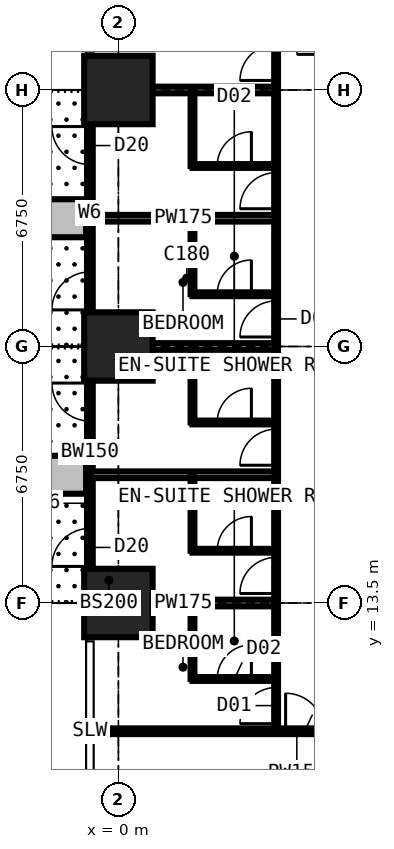
"""IFC4 building model, lengths in metres.
Left out: names, types, materials, properties, quantities, classifications, styles, units other than length and angle.
Written with IfcOpenShell. Run it as: python <this file> out.ifc"""

import sys

from ifc_helpers import new_model, si_unit, direction, frame, frame_2d, origin, origin_2d, place, context, subcontext, project, spatial, rectangle, extrude, element, fill, save


model = new_model("IFC4")
c1 = context("Model", 3, precision=1e-05, world=origin(), true_north=direction((0.0, 1.0)))
c2 = subcontext(c1, "Body", "Model", "MODEL_VIEW")
j1 = project(units=[si_unit("LENGTHUNIT", "METRE"), si_unit("PLANEANGLEUNIT", "RADIAN")], contexts=[c1])
p1 = place(None, origin())
s1 = spatial("IfcSite", under=j1, at=p1, CompositionType="ELEMENT")
p2 = place(p1, origin())
s2 = spatial("IfcBuilding", under=s1, at=p2, CompositionType="ELEMENT")
p3 = place(p2, frame((0.0, 0.0, 46.8)))
s3 = spatial("IfcBuildingStorey", under=s2, at=p3, CompositionType="ELEMENT", Elevation=46.8)
for number, where, z_axis, x_axis in (
    (1, (0.0, 13.5, 0.0), (0.0, 0.0, 1.0), (1.0, 0.0, 0.0)),
    (2, (0.0, 20.25, 0.0), (0.0, 0.0, 1.0), (1.0, 0.0, 0.0)),
    (3, (0.0, 27.0, 0.0), (0.0, 0.0, 1.0), (1.0, 0.0, 0.0)),
):
    element("IfcColumn", number, at=place(p3, frame(where, z_axis=z_axis, x_axis=x_axis)), inside=s3, PredefinedType="COLUMN", context=c2, shape_type="SweptSolid", body=[
        extrude(rectangle(XDim=1.8, YDim=1.8, at=origin_2d()), origin(), (0.0, 0.0, 1.0), 3.6),
    ])
p4 = place(p3, frame((-0.75, 13.5, 0.0), z_axis=(0.0, 0.0, 1.0), x_axis=(0.0, 1.0, 0.0)))
e4 = element("IfcWall", 4, at=p4, inside=s3, PredefinedType="SOLIDWALL", context=c2, shape_type="SweptSolid", body=[
    extrude(rectangle(XDim=6.75, YDim=0.15, at=frame_2d((3.375, 0.0))), origin(), (0.0, 0.0, 1.0), 3.375),
])
p5 = place(p4, frame((0.962, 0.0, 0.0)))
e5 = element("IfcOpeningElement", 5, at=p5, cuts=e4, PredefinedType="OPENING", context=c2, shape_type="SweptSolid", body=[
    extrude(rectangle(XDim=1.0, YDim=2.2, at=frame_2d((0.5, 1.1))), frame((0.0, 0.085, 0.0), z_axis=(0.0, -1.0, 0.0), x_axis=(1.0, 0.0, 0.0)), (0.0, 0.0, 1.0), 0.17),
])
p6 = place(p4, frame((2.025, 0.0, 0.9)))
e6 = element("IfcOpeningElement", 6, at=p6, cuts=e4, PredefinedType="OPENING", context=c2, shape_type="SweptSolid", body=[
    extrude(rectangle(XDim=1.2, YDim=1.8, at=frame_2d((0.6, 0.9))), frame((0.0, 0.085, 0.0), z_axis=(0.0, -1.0, 0.0), x_axis=(1.0, 0.0, 0.0)), (0.0, 0.0, 1.0), 0.17),
])
p7 = place(p4, frame((4.788, 0.0, 0.0)))
e7 = element("IfcOpeningElement", 7, at=p7, cuts=e4, PredefinedType="OPENING", context=c2, shape_type="SweptSolid", body=[
    extrude(rectangle(XDim=1.0, YDim=2.2, at=frame_2d((0.5, 1.1))), frame((0.0, 0.085, 0.0), z_axis=(0.0, -1.0, 0.0), x_axis=(1.0, 0.0, 0.0)), (0.0, 0.0, 1.0), 0.17),
])
p8 = place(p4, frame((3.525, 0.0, 0.9)))
e8 = element("IfcOpeningElement", 8, at=p8, cuts=e4, PredefinedType="OPENING", context=c2, shape_type="SweptSolid", body=[
    extrude(rectangle(XDim=1.2, YDim=1.8, at=frame_2d((0.6, 0.9))), frame((0.0, 0.085, 0.0), z_axis=(0.0, -1.0, 0.0), x_axis=(1.0, 0.0, 0.0)), (0.0, 0.0, 1.0), 0.17),
])
p9 = place(p3, frame((-0.75, 20.25, 0.0), z_axis=(0.0, 0.0, 1.0), x_axis=(0.0, 1.0, 0.0)))
e9 = element("IfcWall", 9, at=p9, inside=s3, PredefinedType="SOLIDWALL", context=c2, shape_type="SweptSolid", body=[
    extrude(rectangle(XDim=6.75, YDim=0.15, at=frame_2d((3.375, 0.0))), origin(), (0.0, 0.0, 1.0), 3.375),
])
p10 = place(p9, frame((0.962, 0.0, 0.0)))
e10 = element("IfcOpeningElement", 10, at=p10, cuts=e9, PredefinedType="OPENING", context=c2, shape_type="SweptSolid", body=[
    extrude(rectangle(XDim=1.0, YDim=2.2, at=frame_2d((0.5, 1.1))), frame((0.0, 0.085, 0.0), z_axis=(0.0, -1.0, 0.0), x_axis=(1.0, 0.0, 0.0)), (0.0, 0.0, 1.0), 0.17),
])
p11 = place(p9, frame((2.025, 0.0, 0.9)))
e11 = element("IfcOpeningElement", 11, at=p11, cuts=e9, PredefinedType="OPENING", context=c2, shape_type="SweptSolid", body=[
    extrude(rectangle(XDim=1.2, YDim=1.8, at=frame_2d((0.6, 0.9))), frame((0.0, 0.085, 0.0), z_axis=(0.0, -1.0, 0.0), x_axis=(1.0, 0.0, 0.0)), (0.0, 0.0, 1.0), 0.17),
])
p12 = place(p9, frame((4.788, 0.0, 0.0)))
e12 = element("IfcOpeningElement", 12, at=p12, cuts=e9, PredefinedType="OPENING", context=c2, shape_type="SweptSolid", body=[
    extrude(rectangle(XDim=1.0, YDim=2.2, at=frame_2d((0.5, 1.1))), frame((0.0, 0.085, 0.0), z_axis=(0.0, -1.0, 0.0), x_axis=(1.0, 0.0, 0.0)), (0.0, 0.0, 1.0), 0.17),
])
p13 = place(p9, frame((3.525, 0.0, 0.9)))
e13 = element("IfcOpeningElement", 13, at=p13, cuts=e9, PredefinedType="OPENING", context=c2, shape_type="SweptSolid", body=[
    extrude(rectangle(XDim=1.2, YDim=1.8, at=frame_2d((0.6, 0.9))), frame((0.0, 0.085, 0.0), z_axis=(0.0, -1.0, 0.0), x_axis=(1.0, 0.0, 0.0)), (0.0, 0.0, 1.0), 0.17),
])
for number, where, z_axis, x_axis in (
    (14, (-0.85, 16.875, 0.0), (0.0, 0.0, 1.0), (-1.0, 0.0, 0.0)),
    (15, (-0.85, 23.625, 0.0), (0.0, 0.0, 1.0), (-1.0, 0.0, 0.0)),
):
    element("IfcWall", number, at=place(p3, frame(where, z_axis=z_axis, x_axis=x_axis)), inside=s3, PredefinedType="USERDEFINED", context=c2, shape_type="SweptSolid", body=[
        extrude(rectangle(XDim=2.2, YDim=1.0, at=frame_2d((1.1, 0.0))), origin(), (0.0, 0.0, 1.0), 0.9),
    ])
p14 = place(p3, frame((-0.734, 10.125, 0.0), z_axis=(0.0, 0.0, 1.0), x_axis=(1.0, 0.0, 0.0)))
e16 = element("IfcWall", 16, at=p14, inside=s3, PredefinedType="PARTITIONING", context=c2, shape_type="SweptSolid", body=[
    extrude(rectangle(XDim=10.859, YDim=0.15, at=frame_2d((5.429, 0.0))), origin(), (0.0, 0.0, 1.0), 3.375),
])
p15 = place(p14, frame((5.134, 0.0, 0.0)))
e17 = element("IfcOpeningElement", 17, at=p15, cuts=e16, PredefinedType="OPENING", context=c2, shape_type="SweptSolid", body=[
    extrude(rectangle(XDim=1.0, YDim=2.2, at=frame_2d((0.5, 1.1))), frame((0.0, 0.085, 0.0), z_axis=(0.0, -1.0, 0.0), x_axis=(1.0, 0.0, 0.0)), (0.0, 0.0, 1.0), 0.17),
])
p16 = place(p14, frame((8.234, 0.0, 0.0)))
e18 = element("IfcOpeningElement", 18, at=p16, cuts=e16, PredefinedType="OPENING", context=c2, shape_type="SweptSolid", body=[
    extrude(rectangle(XDim=0.95, YDim=2.2, at=frame_2d((0.475, 1.1))), frame((0.0, 0.085, 0.0), z_axis=(0.0, -1.0, 0.0), x_axis=(1.0, 0.0, 0.0)), (0.0, 0.0, 1.0), 0.17),
])
p17 = place(p3, frame((-0.734, 13.5, 0.0), z_axis=(0.0, 0.0, 1.0), x_axis=(1.0, 0.0, 0.0)))
e19 = element("IfcWall", 19, at=p17, inside=s3, PredefinedType="PARTITIONING", context=c2, shape_type="SweptSolid", body=[
    extrude(rectangle(XDim=4.884, YDim=0.175, at=frame_2d((2.442, 0.0))), origin(), (0.0, 0.0, 1.0), 2.877),
])
p18 = place(p3, frame((-0.734, 16.875, 0.0), z_axis=(0.0, 0.0, 1.0), x_axis=(1.0, 0.0, 0.0)))
e20 = element("IfcWall", 20, at=p18, inside=s3, PredefinedType="PARTITIONING", context=c2, shape_type="SweptSolid", body=[
    extrude(rectangle(XDim=4.884, YDim=0.175, at=frame_2d((2.442, 0.0))), origin(), (0.0, 0.0, 1.0), 3.375),
])
p19 = place(p3, frame((-0.734, 20.25, 0.0), z_axis=(0.0, 0.0, 1.0), x_axis=(1.0, 0.0, 0.0)))
e21 = element("IfcWall", 21, at=p19, inside=s3, PredefinedType="PARTITIONING", context=c2, shape_type="SweptSolid", body=[
    extrude(rectangle(XDim=4.884, YDim=0.175, at=frame_2d((2.442, 0.0))), origin(), (0.0, 0.0, 1.0), 2.61),
])
p20 = place(p3, frame((-0.734, 23.625, 0.0), z_axis=(0.0, 0.0, 1.0), x_axis=(1.0, 0.0, 0.0)))
e22 = element("IfcWall", 22, at=p20, inside=s3, PredefinedType="PARTITIONING", context=c2, shape_type="SweptSolid", body=[
    extrude(rectangle(XDim=4.884, YDim=0.175, at=frame_2d((2.442, 0.0))), origin(), (0.0, 0.0, 1.0), 3.375),
])
p21 = place(p3, frame((-0.734, 27.0, 0.0), z_axis=(0.0, 0.0, 1.0), x_axis=(1.0, 0.0, 0.0)))
e23 = element("IfcWall", 23, at=p21, inside=s3, PredefinedType="PARTITIONING", context=c2, shape_type="SweptSolid", body=[
    extrude(rectangle(XDim=4.884, YDim=0.175, at=frame_2d((2.442, 0.0))), origin(), (0.0, 0.0, 1.0), 2.61),
])
p22 = place(p3, frame((1.95, 11.5, 0.0), z_axis=(0.0, 0.0, 1.0), x_axis=(0.0, 1.0, 0.0)))
e24 = element("IfcWall", 24, at=p22, inside=s3, PredefinedType="PARTITIONING", context=c2, shape_type="SweptSolid", body=[
    extrude(rectangle(XDim=2.0, YDim=0.1, at=frame_2d((1.0, 0.0))), origin(), (0.0, 0.0, 1.0), 3.375),
])
p23 = place(p3, frame((1.95, 11.5, 0.0), z_axis=(0.0, 0.0, 1.0), x_axis=(1.0, 0.0, 0.0)))
e25 = element("IfcWall", 25, at=p23, inside=s3, PredefinedType="PARTITIONING", context=c2, shape_type="SweptSolid", body=[
    extrude(rectangle(XDim=2.2, YDim=0.1, at=frame_2d((1.1, 0.0))), origin(), (0.0, 0.0, 1.0), 3.375),
])
p24 = place(p23, frame((0.65, 0.0, 0.0)))
e26 = element("IfcOpeningElement", 26, at=p24, cuts=e25, PredefinedType="OPENING", context=c2, shape_type="SweptSolid", body=[
    extrude(rectangle(XDim=0.9, YDim=2.2, at=frame_2d((0.45, 1.1))), frame((0.0, 0.06, 0.0), z_axis=(0.0, -1.0, 0.0), x_axis=(1.0, 0.0, 0.0)), (0.0, 0.0, 1.0), 0.12),
])
p25 = place(p3, frame((1.95, 14.875, 0.0), z_axis=(0.0, 0.0, 1.0), x_axis=(0.0, 1.0, 0.0)))
e27 = element("IfcWall", 27, at=p25, inside=s3, PredefinedType="PARTITIONING", context=c2, shape_type="SweptSolid", body=[
    extrude(rectangle(XDim=2.0, YDim=0.1, at=frame_2d((1.0, 0.0))), origin(), (0.0, 0.0, 1.0), 3.375),
])
p26 = place(p3, frame((1.95, 14.875, 0.0), z_axis=(0.0, 0.0, 1.0), x_axis=(1.0, 0.0, 0.0)))
e28 = element("IfcWall", 28, at=p26, inside=s3, PredefinedType="PARTITIONING", context=c2, shape_type="SweptSolid", body=[
    extrude(rectangle(XDim=2.2, YDim=0.1, at=frame_2d((1.1, 0.0))), origin(), (0.0, 0.0, 1.0), 3.375),
])
p27 = place(p26, frame((0.65, 0.0, 0.0)))
e29 = element("IfcOpeningElement", 29, at=p27, cuts=e28, PredefinedType="OPENING", context=c2, shape_type="SweptSolid", body=[
    extrude(rectangle(XDim=0.9, YDim=2.2, at=frame_2d((0.45, 1.1))), frame((0.0, 0.06, 0.0), z_axis=(0.0, -1.0, 0.0), x_axis=(1.0, 0.0, 0.0)), (0.0, 0.0, 1.0), 0.12),
])
p28 = place(p3, frame((1.95, 18.25, 0.0), z_axis=(0.0, 0.0, 1.0), x_axis=(0.0, 1.0, 0.0)))
e30 = element("IfcWall", 30, at=p28, inside=s3, PredefinedType="PARTITIONING", context=c2, shape_type="SweptSolid", body=[
    extrude(rectangle(XDim=2.0, YDim=0.1, at=frame_2d((1.0, 0.0))), origin(), (0.0, 0.0, 1.0), 3.375),
])
p29 = place(p3, frame((1.95, 18.25, 0.0), z_axis=(0.0, 0.0, 1.0), x_axis=(1.0, 0.0, 0.0)))
e31 = element("IfcWall", 31, at=p29, inside=s3, PredefinedType="PARTITIONING", context=c2, shape_type="SweptSolid", body=[
    extrude(rectangle(XDim=2.2, YDim=0.1, at=frame_2d((1.1, 0.0))), origin(), (0.0, 0.0, 1.0), 3.375),
])
p30 = place(p29, frame((0.65, 0.0, 0.0)))
e32 = element("IfcOpeningElement", 32, at=p30, cuts=e31, PredefinedType="OPENING", context=c2, shape_type="SweptSolid", body=[
    extrude(rectangle(XDim=0.9, YDim=2.2, at=frame_2d((0.45, 1.1))), frame((0.0, 0.06, 0.0), z_axis=(0.0, -1.0, 0.0), x_axis=(1.0, 0.0, 0.0)), (0.0, 0.0, 1.0), 0.12),
])
p31 = place(p3, frame((1.95, 21.625, 0.0), z_axis=(0.0, 0.0, 1.0), x_axis=(0.0, 1.0, 0.0)))
e33 = element("IfcWall", 33, at=p31, inside=s3, PredefinedType="PARTITIONING", context=c2, shape_type="SweptSolid", body=[
    extrude(rectangle(XDim=2.0, YDim=0.1, at=frame_2d((1.0, 0.0))), origin(), (0.0, 0.0, 1.0), 3.375),
])
p32 = place(p3, frame((1.95, 21.625, 0.0), z_axis=(0.0, 0.0, 1.0), x_axis=(1.0, 0.0, 0.0)))
e34 = element("IfcWall", 34, at=p32, inside=s3, PredefinedType="PARTITIONING", context=c2, shape_type="SweptSolid", body=[
    extrude(rectangle(XDim=2.2, YDim=0.1, at=frame_2d((1.1, 0.0))), origin(), (0.0, 0.0, 1.0), 3.375),
])
p33 = place(p32, frame((0.65, 0.0, 0.0)))
e35 = element("IfcOpeningElement", 35, at=p33, cuts=e34, PredefinedType="OPENING", context=c2, shape_type="SweptSolid", body=[
    extrude(rectangle(XDim=0.9, YDim=2.2, at=frame_2d((0.45, 1.1))), frame((0.0, 0.06, 0.0), z_axis=(0.0, -1.0, 0.0), x_axis=(1.0, 0.0, 0.0)), (0.0, 0.0, 1.0), 0.12),
])
p34 = place(p3, frame((1.95, 25.0, 0.0), z_axis=(0.0, 0.0, 1.0), x_axis=(0.0, 1.0, 0.0)))
e36 = element("IfcWall", 36, at=p34, inside=s3, PredefinedType="PARTITIONING", context=c2, shape_type="SweptSolid", body=[
    extrude(rectangle(XDim=2.0, YDim=0.1, at=frame_2d((1.0, 0.0))), origin(), (0.0, 0.0, 1.0), 3.375),
])
p35 = place(p3, frame((1.95, 25.0, 0.0), z_axis=(0.0, 0.0, 1.0), x_axis=(1.0, 0.0, 0.0)))
e37 = element("IfcWall", 37, at=p35, inside=s3, PredefinedType="PARTITIONING", context=c2, shape_type="SweptSolid", body=[
    extrude(rectangle(XDim=2.2, YDim=0.1, at=frame_2d((1.1, 0.0))), origin(), (0.0, 0.0, 1.0), 3.375),
])
p36 = place(p35, frame((0.65, 0.0, 0.0)))
e38 = element("IfcOpeningElement", 38, at=p36, cuts=e37, PredefinedType="OPENING", context=c2, shape_type="SweptSolid", body=[
    extrude(rectangle(XDim=0.9, YDim=2.2, at=frame_2d((0.45, 1.1))), frame((0.0, 0.06, 0.0), z_axis=(0.0, -1.0, 0.0), x_axis=(1.0, 0.0, 0.0)), (0.0, 0.0, 1.0), 0.12),
])
p37 = place(p3, frame((4.15, 10.125, 0.0), z_axis=(0.0, 0.0, 1.0), x_axis=(0.0, 1.0, 0.0)))
e39 = element("IfcWall", 39, at=p37, inside=s3, PredefinedType="PARTITIONING", context=c2, shape_type="SweptSolid", body=[
    extrude(rectangle(XDim=23.625, YDim=0.1, at=frame_2d((11.812, 0.0))), origin(), (0.0, 0.0, 1.0), 3.375),
])
p38 = place(p37, frame((0.2, 0.0, 0.0)))
e40 = element("IfcOpeningElement", 40, at=p38, cuts=e39, PredefinedType="OPENING", context=c2, shape_type="SweptSolid", body=[
    extrude(rectangle(XDim=0.95, YDim=2.2, at=frame_2d((0.475, 1.1))), frame((0.0, 0.06, 0.0), z_axis=(0.0, -1.0, 0.0), x_axis=(1.0, 0.0, 0.0)), (0.0, 0.0, 1.0), 0.12),
])
p39 = place(p37, frame((3.625, 0.0, 0.0)))
e41 = element("IfcOpeningElement", 41, at=p39, cuts=e39, PredefinedType="OPENING", context=c2, shape_type="SweptSolid", body=[
    extrude(rectangle(XDim=0.95, YDim=2.2, at=frame_2d((0.475, 1.1))), frame((0.0, 0.06, 0.0), z_axis=(0.0, -1.0, 0.0), x_axis=(1.0, 0.0, 0.0)), (0.0, 0.0, 1.0), 0.12),
])
p40 = place(p37, frame((7.0, 0.0, 0.0)))
e42 = element("IfcOpeningElement", 42, at=p40, cuts=e39, PredefinedType="OPENING", context=c2, shape_type="SweptSolid", body=[
    extrude(rectangle(XDim=0.95, YDim=2.2, at=frame_2d((0.475, 1.1))), frame((0.0, 0.06, 0.0), z_axis=(0.0, -1.0, 0.0), x_axis=(1.0, 0.0, 0.0)), (0.0, 0.0, 1.0), 0.12),
])
p41 = place(p37, frame((10.375, 0.0, 0.0)))
e43 = element("IfcOpeningElement", 43, at=p41, cuts=e39, PredefinedType="OPENING", context=c2, shape_type="SweptSolid", body=[
    extrude(rectangle(XDim=0.95, YDim=2.2, at=frame_2d((0.475, 1.1))), frame((0.0, 0.06, 0.0), z_axis=(0.0, -1.0, 0.0), x_axis=(1.0, 0.0, 0.0)), (0.0, 0.0, 1.0), 0.12),
])
p42 = place(p37, frame((13.75, 0.0, 0.0)))
e44 = element("IfcOpeningElement", 44, at=p42, cuts=e39, PredefinedType="OPENING", context=c2, shape_type="SweptSolid", body=[
    extrude(rectangle(XDim=0.95, YDim=2.2, at=frame_2d((0.475, 1.1))), frame((0.0, 0.06, 0.0), z_axis=(0.0, -1.0, 0.0), x_axis=(1.0, 0.0, 0.0)), (0.0, 0.0, 1.0), 0.12),
])
p43 = place(p37, frame((17.125, 0.0, 0.0)))
e45 = element("IfcOpeningElement", 45, at=p43, cuts=e39, PredefinedType="OPENING", context=c2, shape_type="SweptSolid", body=[
    extrude(rectangle(XDim=0.95, YDim=2.2, at=frame_2d((0.475, 1.1))), frame((0.0, 0.06, 0.0), z_axis=(0.0, -1.0, 0.0), x_axis=(1.0, 0.0, 0.0)), (0.0, 0.0, 1.0), 0.12),
])
p44 = place(p37, frame((20.5, 0.0, 0.0)))
e46 = element("IfcOpeningElement", 46, at=p44, cuts=e39, PredefinedType="OPENING", context=c2, shape_type="SweptSolid", body=[
    extrude(rectangle(XDim=0.95, YDim=2.2, at=frame_2d((0.475, 1.1))), frame((0.0, 0.06, 0.0), z_axis=(0.0, -1.0, 0.0), x_axis=(1.0, 0.0, 0.0)), (0.0, 0.0, 1.0), 0.12),
])
p45 = place(p5, origin())
e47 = element("IfcDoor", 47, at=p45, inside=s3, OperationType="SINGLE_SWING_LEFT", PredefinedType="DOOR", context=c2, shape_type="SweptSolid", body=[
    extrude(rectangle(XDim=1.0, YDim=2.2, at=frame_2d((0.5, 1.1))), frame((0.0, 0.025, 0.0), z_axis=(0.0, -1.0, 0.0), x_axis=(1.0, 0.0, 0.0)), (0.0, 0.0, 1.0), 0.05),
])
fill(e5, e47)
p46 = place(p6, origin())
e48 = element("IfcWindow", 48, at=p46, inside=s3, PartitioningType="SINGLE_PANEL", PredefinedType="WINDOW", context=c2, shape_type="SweptSolid", body=[
    extrude(rectangle(XDim=1.2, YDim=1.8, at=frame_2d((0.6, 0.9))), frame((0.0, 0.03, 0.0), z_axis=(0.0, -1.0, 0.0), x_axis=(1.0, 0.0, 0.0)), (0.0, 0.0, 1.0), 0.06),
])
fill(e6, e48)
p47 = place(p7, origin())
e49 = element("IfcDoor", 49, at=p47, inside=s3, OperationType="SINGLE_SWING_RIGHT", PredefinedType="DOOR", context=c2, shape_type="SweptSolid", body=[
    extrude(rectangle(XDim=1.0, YDim=2.2, at=frame_2d((0.5, 1.1))), frame((0.0, 0.025, 0.0), z_axis=(0.0, -1.0, 0.0), x_axis=(1.0, 0.0, 0.0)), (0.0, 0.0, 1.0), 0.05),
])
fill(e7, e49)
p48 = place(p8, origin())
e50 = element("IfcWindow", 50, at=p48, inside=s3, PartitioningType="SINGLE_PANEL", PredefinedType="WINDOW", context=c2, shape_type="SweptSolid", body=[
    extrude(rectangle(XDim=1.2, YDim=1.8, at=frame_2d((0.6, 0.9))), frame((0.0, 0.03, 0.0), z_axis=(0.0, -1.0, 0.0), x_axis=(1.0, 0.0, 0.0)), (0.0, 0.0, 1.0), 0.06),
])
fill(e8, e50)
p49 = place(p10, origin())
e51 = element("IfcDoor", 51, at=p49, inside=s3, OperationType="SINGLE_SWING_LEFT", PredefinedType="DOOR", context=c2, shape_type="SweptSolid", body=[
    extrude(rectangle(XDim=1.0, YDim=2.2, at=frame_2d((0.5, 1.1))), frame((0.0, 0.025, 0.0), z_axis=(0.0, -1.0, 0.0), x_axis=(1.0, 0.0, 0.0)), (0.0, 0.0, 1.0), 0.05),
])
fill(e10, e51)
p50 = place(p11, origin())
e52 = element("IfcWindow", 52, at=p50, inside=s3, PartitioningType="SINGLE_PANEL", PredefinedType="WINDOW", context=c2, shape_type="SweptSolid", body=[
    extrude(rectangle(XDim=1.2, YDim=1.8, at=frame_2d((0.6, 0.9))), frame((0.0, 0.03, 0.0), z_axis=(0.0, -1.0, 0.0), x_axis=(1.0, 0.0, 0.0)), (0.0, 0.0, 1.0), 0.06),
])
fill(e11, e52)
p51 = place(p12, origin())
e53 = element("IfcDoor", 53, at=p51, inside=s3, OperationType="SINGLE_SWING_RIGHT", PredefinedType="DOOR", context=c2, shape_type="SweptSolid", body=[
    extrude(rectangle(XDim=1.0, YDim=2.2, at=frame_2d((0.5, 1.1))), frame((0.0, 0.025, 0.0), z_axis=(0.0, -1.0, 0.0), x_axis=(1.0, 0.0, 0.0)), (0.0, 0.0, 1.0), 0.05),
])
fill(e12, e53)
p52 = place(p13, origin())
e54 = element("IfcWindow", 54, at=p52, inside=s3, PartitioningType="SINGLE_PANEL", PredefinedType="WINDOW", context=c2, shape_type="SweptSolid", body=[
    extrude(rectangle(XDim=1.2, YDim=1.8, at=frame_2d((0.6, 0.9))), frame((0.0, 0.03, 0.0), z_axis=(0.0, -1.0, 0.0), x_axis=(1.0, 0.0, 0.0)), (0.0, 0.0, 1.0), 0.06),
])
fill(e13, e54)
p53 = place(p15, origin())
e55 = element("IfcDoor", 55, at=p53, inside=s3, OperationType="SINGLE_SWING_LEFT", PredefinedType="DOOR", context=c2, shape_type="SweptSolid", body=[
    extrude(rectangle(XDim=1.0, YDim=2.2, at=frame_2d((0.5, 1.1))), frame((0.0, 0.025, 0.0), z_axis=(0.0, -1.0, 0.0), x_axis=(1.0, 0.0, 0.0)), (0.0, 0.0, 1.0), 0.05),
])
fill(e17, e55)
p54 = place(p38, origin())
e56 = element("IfcDoor", 56, at=p54, inside=s3, OperationType="SINGLE_SWING_LEFT", PredefinedType="DOOR", context=c2, shape_type="SweptSolid", body=[
    extrude(rectangle(XDim=0.95, YDim=2.2, at=frame_2d((0.475, 1.1))), frame((0.0, 0.025, 0.0), z_axis=(0.0, -1.0, 0.0), x_axis=(1.0, 0.0, 0.0)), (0.0, 0.0, 1.0), 0.05),
])
fill(e40, e56)
p55 = place(p24, origin())
e57 = element("IfcDoor", 57, at=p55, inside=s3, OperationType="SINGLE_SWING_RIGHT", PredefinedType="DOOR", context=c2, shape_type="SweptSolid", body=[
    extrude(rectangle(XDim=0.9, YDim=2.2, at=frame_2d((0.45, 1.1))), frame((0.0, 0.025, 0.0), z_axis=(0.0, -1.0, 0.0), x_axis=(1.0, 0.0, 0.0)), (0.0, 0.0, 1.0), 0.05),
])
fill(e26, e57)
p56 = place(p39, origin())
e58 = element("IfcDoor", 58, at=p56, inside=s3, OperationType="SINGLE_SWING_LEFT", PredefinedType="DOOR", context=c2, shape_type="SweptSolid", body=[
    extrude(rectangle(XDim=0.95, YDim=2.2, at=frame_2d((0.475, 1.1))), frame((0.0, 0.025, 0.0), z_axis=(0.0, -1.0, 0.0), x_axis=(1.0, 0.0, 0.0)), (0.0, 0.0, 1.0), 0.05),
])
fill(e41, e58)
p57 = place(p27, origin())
e59 = element("IfcDoor", 59, at=p57, inside=s3, OperationType="SINGLE_SWING_RIGHT", PredefinedType="DOOR", context=c2, shape_type="SweptSolid", body=[
    extrude(rectangle(XDim=0.9, YDim=2.2, at=frame_2d((0.45, 1.1))), frame((0.0, 0.025, 0.0), z_axis=(0.0, -1.0, 0.0), x_axis=(1.0, 0.0, 0.0)), (0.0, 0.0, 1.0), 0.05),
])
fill(e29, e59)
p58 = place(p40, origin())
e60 = element("IfcDoor", 60, at=p58, inside=s3, OperationType="SINGLE_SWING_LEFT", PredefinedType="DOOR", context=c2, shape_type="SweptSolid", body=[
    extrude(rectangle(XDim=0.95, YDim=2.2, at=frame_2d((0.475, 1.1))), frame((0.0, 0.025, 0.0), z_axis=(0.0, -1.0, 0.0), x_axis=(1.0, 0.0, 0.0)), (0.0, 0.0, 1.0), 0.05),
])
fill(e42, e60)
p59 = place(p30, origin())
e61 = element("IfcDoor", 61, at=p59, inside=s3, OperationType="SINGLE_SWING_RIGHT", PredefinedType="DOOR", context=c2, shape_type="SweptSolid", body=[
    extrude(rectangle(XDim=0.9, YDim=2.2, at=frame_2d((0.45, 1.1))), frame((0.0, 0.025, 0.0), z_axis=(0.0, -1.0, 0.0), x_axis=(1.0, 0.0, 0.0)), (0.0, 0.0, 1.0), 0.05),
])
fill(e32, e61)
p60 = place(p41, origin())
e62 = element("IfcDoor", 62, at=p60, inside=s3, OperationType="SINGLE_SWING_LEFT", PredefinedType="DOOR", context=c2, shape_type="SweptSolid", body=[
    extrude(rectangle(XDim=0.95, YDim=2.2, at=frame_2d((0.475, 1.1))), frame((0.0, 0.025, 0.0), z_axis=(0.0, -1.0, 0.0), x_axis=(1.0, 0.0, 0.0)), (0.0, 0.0, 1.0), 0.05),
])
fill(e43, e62)
p61 = place(p33, origin())
e63 = element("IfcDoor", 63, at=p61, inside=s3, OperationType="SINGLE_SWING_RIGHT", PredefinedType="DOOR", context=c2, shape_type="SweptSolid", body=[
    extrude(rectangle(XDim=0.9, YDim=2.2, at=frame_2d((0.45, 1.1))), frame((0.0, 0.025, 0.0), z_axis=(0.0, -1.0, 0.0), x_axis=(1.0, 0.0, 0.0)), (0.0, 0.0, 1.0), 0.05),
])
fill(e35, e63)
p62 = place(p42, origin())
e64 = element("IfcDoor", 64, at=p62, inside=s3, OperationType="SINGLE_SWING_LEFT", PredefinedType="DOOR", context=c2, shape_type="SweptSolid", body=[
    extrude(rectangle(XDim=0.95, YDim=2.2, at=frame_2d((0.475, 1.1))), frame((0.0, 0.025, 0.0), z_axis=(0.0, -1.0, 0.0), x_axis=(1.0, 0.0, 0.0)), (0.0, 0.0, 1.0), 0.05),
])
fill(e44, e64)
p63 = place(p36, origin())
e65 = element("IfcDoor", 65, at=p63, inside=s3, OperationType="SINGLE_SWING_RIGHT", PredefinedType="DOOR", context=c2, shape_type="SweptSolid", body=[
    extrude(rectangle(XDim=0.9, YDim=2.2, at=frame_2d((0.45, 1.1))), frame((0.0, 0.025, 0.0), z_axis=(0.0, -1.0, 0.0), x_axis=(1.0, 0.0, 0.0)), (0.0, 0.0, 1.0), 0.05),
])
fill(e38, e65)
p64 = place(p43, origin())
e66 = element("IfcDoor", 66, at=p64, inside=s3, OperationType="SINGLE_SWING_LEFT", PredefinedType="DOOR", context=c2, shape_type="SweptSolid", body=[
    extrude(rectangle(XDim=0.95, YDim=2.2, at=frame_2d((0.475, 1.1))), frame((0.0, 0.025, 0.0), z_axis=(0.0, -1.0, 0.0), x_axis=(1.0, 0.0, 0.0)), (0.0, 0.0, 1.0), 0.05),
])
fill(e45, e66)
save(model, sys.argv[1])
